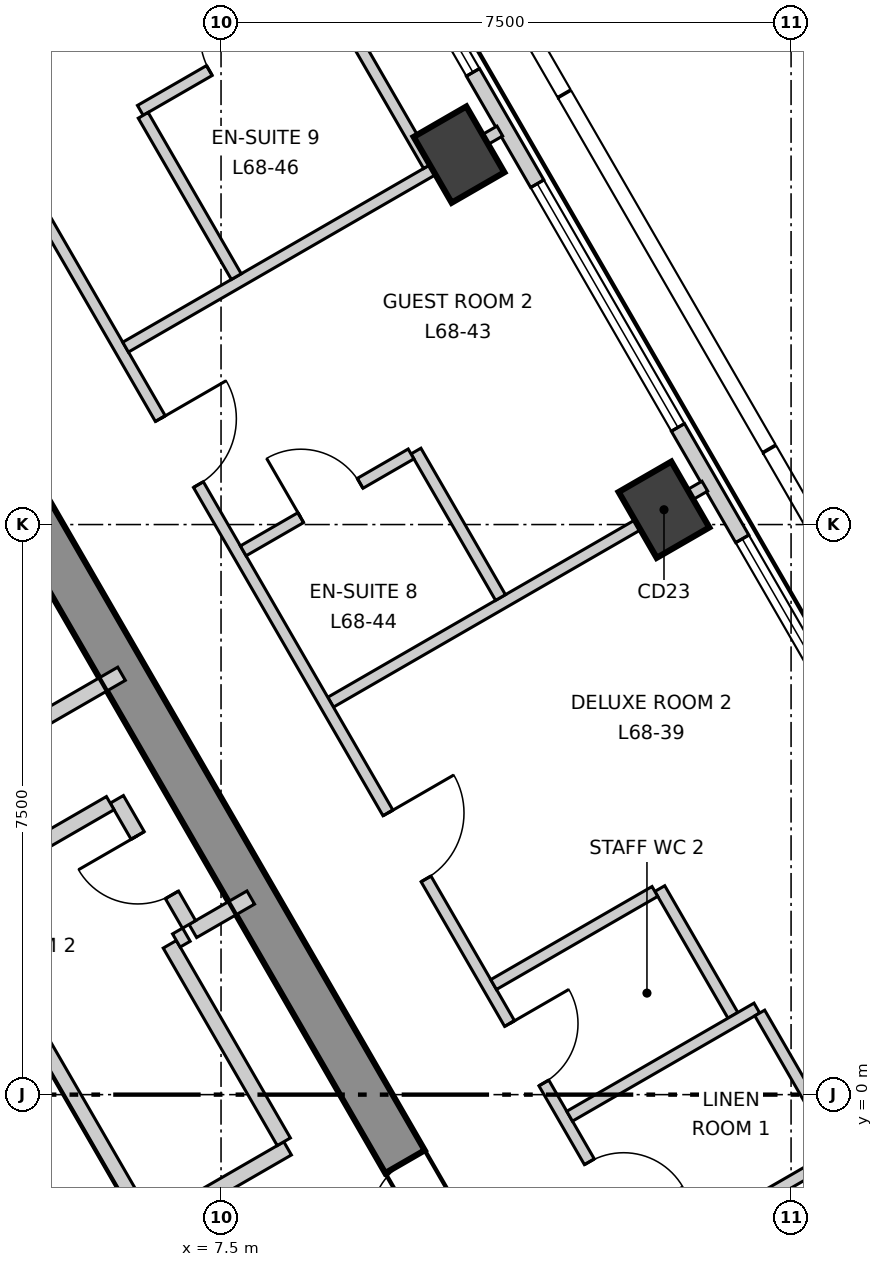
"""IFC4 building model, lengths in metres.
Left out: names, types, materials, properties, quantities, classifications, styles, units other than length and angle.
Written with IfcOpenShell. Run it as: python <this file> out.ifc"""

import sys

from ifc_helpers import new_model, si_unit, direction, frame, frame_2d, origin, origin_2d, place, context, subcontext, project, spatial, polyline, rectangle, outline, extrude, element, fill, save


model = new_model("IFC4")
c1 = context("Model", 3, precision=1e-05, world=origin(), true_north=direction((0.0, 1.0)))
c2 = subcontext(c1, "Body", "Model", "MODEL_VIEW")
j1 = project(units=[si_unit("LENGTHUNIT", "METRE"), si_unit("PLANEANGLEUNIT", "RADIAN")], contexts=[c1])
p1 = place(None, origin())
s1 = spatial("IfcSite", under=j1, at=p1, CompositionType="ELEMENT")
p2 = place(p1, origin())
s2 = spatial("IfcBuilding", under=s1, at=p2, CompositionType="ELEMENT")
p3 = place(p2, frame((0.0, 0.0, 289.9)))
s3 = spatial("IfcBuildingStorey", under=s2, at=p3, CompositionType="ELEMENT", Elevation=289.9)
p4 = place(p3, frame((12.384, -5.15, -0.3), z_axis=(0.0, 0.0, 1.0), x_axis=(-0.500000539815, 0.866025092122, 0.0)))
e1 = element("IfcWall", 1, at=p4, inside=s3, PredefinedType="SHEAR", context=c2, shape_type="SweptSolid", body=[
    extrude(outline(polyline([(-0.173, -0.301), (1.795, -0.301), (3.763, -0.301), (5.731, -0.301), (7.7, -0.301), (9.668, -0.301), (11.636, -0.301), (13.604, -0.3), (15.573, -0.3), (17.541, -0.3), (19.509, -0.3), (21.477, -0.3), (21.131, 0.3), (19.226, 0.3), (17.321, 0.3), (15.415, 0.3), (13.51, 0.3), (11.605, 0.3), (9.699, 0.3), (7.794, 0.3), (5.889, 0.3), (3.984, 0.3), (2.078, 0.3), (0.173, 0.3), (-0.173, -0.301)])), origin(), (0.0, 0.0, 1.0), 3.6),
])
p5 = place(p4, frame((16.378, 0.0, 0.3)))
e2 = element("IfcOpeningElement", 2, at=p5, cuts=e1, PredefinedType="OPENING", context=c2, shape_type="SweptSolid", body=[
    extrude(rectangle(XDim=0.9, YDim=2.1, at=frame_2d((0.45, 1.05))), frame((0.0, 0.31, 0.0), z_axis=(0.0, -1.0, 0.0), x_axis=(1.0, 0.0, 0.0)), (0.0, 0.0, 1.0), 0.621),
])
p6 = place(p4, frame((4.026, 0.0, 0.3)))
e3 = element("IfcOpeningElement", 3, at=p6, cuts=e1, PredefinedType="OPENING", context=c2, shape_type="SweptSolid", body=[
    extrude(rectangle(XDim=0.9, YDim=2.1, at=frame_2d((0.45, 1.05))), frame((0.0, 0.31, 0.0), z_axis=(0.0, -1.0, 0.0), x_axis=(1.0, 0.0, 0.0)), (0.0, 0.0, 1.0), 0.621),
])
for number, where, z_axis, x_axis in (
    (4, (13.328, 7.695, -0.3), (0.0, 0.0, 1.0), (-0.5, 0.866, 0.0)),
    (5, (10.631, 12.367, -0.3), (0.0, 0.0, 1.0), (-0.5, 0.866, 0.0)),
):
    element("IfcColumn", number, at=place(p3, frame(where, z_axis=z_axis, x_axis=x_axis)), inside=s3, PredefinedType="COLUMN", context=c2, shape_type="SweptSolid", body=[
        extrude(rectangle(XDim=1.0, YDim=0.8, at=origin_2d()), origin(), (0.0, 0.0, 1.0), 3.6),
    ])
p7 = place(p3, frame((25.375, -11.77, 0.0), z_axis=(0.0, 0.0, 1.0), x_axis=(-0.500008134474, 0.866020707292, 0.0)))
e6 = element("IfcWall", 6, at=p7, inside=s3, PredefinedType="ELEMENTEDWALL", context=c2, shape_type="SweptSolid", body=[
    extrude(rectangle(XDim=45.741, YDim=0.2, at=frame_2d((22.871, 0.0))), origin(), (0.0, 0.0, 1.0), 3.3),
])
p8 = place(p7, frame((2.15, 0.0, 0.9)))
e7 = element("IfcOpeningElement", 7, at=p8, cuts=e6, PredefinedType="OPENING", context=c2, shape_type="SweptSolid", body=[
    extrude(rectangle(XDim=3.7, YDim=2.2, at=frame_2d((1.85, 1.1))), frame((0.0, 0.11, 0.0), z_axis=(0.0, -1.0, 0.0), x_axis=(1.0, 0.0, 0.0)), (0.0, 0.0, 1.0), 0.22),
])
p9 = place(p7, frame((7.544, 0.0, 0.9)))
e8 = element("IfcOpeningElement", 8, at=p9, cuts=e6, PredefinedType="OPENING", context=c2, shape_type="SweptSolid", body=[
    extrude(rectangle(XDim=3.7, YDim=2.2, at=frame_2d((1.85, 1.1))), frame((0.0, 0.11, 0.0), z_axis=(0.0, -1.0, 0.0), x_axis=(1.0, 0.0, 0.0)), (0.0, 0.0, 1.0), 0.22),
])
p10 = place(p7, frame((12.939, 0.0, 0.9)))
e9 = element("IfcOpeningElement", 9, at=p10, cuts=e6, PredefinedType="OPENING", context=c2, shape_type="SweptSolid", body=[
    extrude(rectangle(XDim=3.7, YDim=2.2, at=frame_2d((1.85, 1.1))), frame((0.0, 0.11, 0.0), z_axis=(0.0, -1.0, 0.0), x_axis=(1.0, 0.0, 0.0)), (0.0, 0.0, 1.0), 0.22),
])
p11 = place(p7, frame((18.333, 0.0, 0.9)))
e10 = element("IfcOpeningElement", 10, at=p11, cuts=e6, PredefinedType="OPENING", context=c2, shape_type="SweptSolid", body=[
    extrude(rectangle(XDim=3.7, YDim=2.2, at=frame_2d((1.85, 1.1))), frame((0.0, 0.11, 0.0), z_axis=(0.0, -1.0, 0.0), x_axis=(1.0, 0.0, 0.0)), (0.0, 0.0, 1.0), 0.22),
])
p12 = place(p7, frame((23.728, 0.0, 0.9)))
e11 = element("IfcOpeningElement", 11, at=p12, cuts=e6, PredefinedType="OPENING", context=c2, shape_type="SweptSolid", body=[
    extrude(rectangle(XDim=3.7, YDim=2.2, at=frame_2d((1.85, 1.1))), frame((0.0, 0.11, 0.0), z_axis=(0.0, -1.0, 0.0), x_axis=(1.0, 0.0, 0.0)), (0.0, 0.0, 1.0), 0.22),
])
p13 = place(p7, frame((29.122, 0.0, 0.9)))
e12 = element("IfcOpeningElement", 12, at=p13, cuts=e6, PredefinedType="OPENING", context=c2, shape_type="SweptSolid", body=[
    extrude(rectangle(XDim=3.7, YDim=2.2, at=frame_2d((1.85, 1.1))), frame((0.0, 0.11, 0.0), z_axis=(0.0, -1.0, 0.0), x_axis=(1.0, 0.0, 0.0)), (0.0, 0.0, 1.0), 0.22),
])
p14 = place(p7, frame((34.517, 0.0, 0.9)))
e13 = element("IfcOpeningElement", 13, at=p14, cuts=e6, PredefinedType="OPENING", context=c2, shape_type="SweptSolid", body=[
    extrude(rectangle(XDim=3.7, YDim=2.2, at=frame_2d((1.85, 1.1))), frame((0.0, 0.11, 0.0), z_axis=(0.0, -1.0, 0.0), x_axis=(1.0, 0.0, 0.0)), (0.0, 0.0, 1.0), 0.22),
])
p15 = place(p7, frame((39.911, 0.0, 0.9)))
e14 = element("IfcOpeningElement", 14, at=p15, cuts=e6, PredefinedType="OPENING", context=c2, shape_type="SweptSolid", body=[
    extrude(rectangle(XDim=3.7, YDim=2.2, at=frame_2d((1.85, 1.1))), frame((0.0, 0.11, 0.0), z_axis=(0.0, -1.0, 0.0), x_axis=(1.0, 0.0, 0.0)), (0.0, 0.0, 1.0), 0.22),
])
p16 = place(p3, frame((8.942, 5.163, 0.0), z_axis=(0.0, 0.0, 1.0), x_axis=(0.86606758311, 0.499926936147, 0.0)))
e15 = element("IfcWall", 15, at=p16, inside=s3, PredefinedType="PARTITIONING", context=c2, shape_type="SweptSolid", body=[
    extrude(rectangle(XDim=5.684, YDim=0.15, at=frame_2d((2.842, 0.0))), origin(), (0.0, 0.0, 1.0), 2.8),
])
p17 = place(p3, frame((0.075, 20.37, 0.0), z_axis=(0.0, 0.0, 1.0), x_axis=(0.500009775255, -0.866019759965, 0.0)))
e16 = element("IfcWall", 16, at=p17, inside=s3, PredefinedType="PARTITIONING", context=c2, shape_type="SweptSolid", body=[
    extrude(rectangle(XDim=35.207, YDim=0.15, at=frame_2d((17.604, 0.0))), origin(), (0.0, 0.0, 1.0), 3.3),
])
p18 = place(p17, frame((31.407, 0.0, 0.0)))
e17 = element("IfcOpeningElement", 17, at=p18, cuts=e16, PredefinedType="OPENING", context=c2, shape_type="SweptSolid", body=[
    extrude(rectangle(XDim=1.0, YDim=2.1, at=frame_2d((0.5, 1.05))), frame((0.0, 0.085, 0.0), z_axis=(0.0, -1.0, 0.0), x_axis=(1.0, 0.0, 0.0)), (0.0, 0.0, 1.0), 0.17),
])
p19 = place(p17, frame((19.243, 0.0, 0.0)))
e18 = element("IfcOpeningElement", 18, at=p19, cuts=e16, PredefinedType="OPENING", context=c2, shape_type="SweptSolid", body=[
    extrude(rectangle(XDim=1.0, YDim=2.1, at=frame_2d((0.5, 1.05))), frame((0.0, 0.085, 0.0), z_axis=(0.0, -1.0, 0.0), x_axis=(1.0, 0.0, 0.0)), (0.0, 0.0, 1.0), 0.17),
])
p20 = place(p17, frame((24.543, 0.0, 0.0)))
e19 = element("IfcOpeningElement", 19, at=p20, cuts=e16, PredefinedType="OPENING", context=c2, shape_type="SweptSolid", body=[
    extrude(rectangle(XDim=0.9, YDim=2.1, at=frame_2d((0.45, 1.05))), frame((0.0, 0.085, 0.0), z_axis=(0.0, -1.0, 0.0), x_axis=(1.0, 0.0, 0.0)), (0.0, 0.0, 1.0), 0.17),
])
p21 = place(p17, frame((22.443, 0.0, 0.0)))
e20 = element("IfcOpeningElement", 20, at=p21, cuts=e16, PredefinedType="OPENING", context=c2, shape_type="SweptSolid", body=[
    extrude(rectangle(XDim=0.9, YDim=2.1, at=frame_2d((0.45, 1.05))), frame((0.0, 0.085, 0.0), z_axis=(0.0, -1.0, 0.0), x_axis=(1.0, 0.0, 0.0)), (0.0, 0.0, 1.0), 0.17),
])
p22 = place(p17, frame((13.253, 0.0, 0.0)))
e21 = element("IfcOpeningElement", 21, at=p22, cuts=e16, PredefinedType="OPENING", context=c2, shape_type="SweptSolid", body=[
    extrude(rectangle(XDim=1.0, YDim=2.1, at=frame_2d((0.5, 1.05))), frame((0.0, 0.085, 0.0), z_axis=(0.0, -1.0, 0.0), x_axis=(1.0, 0.0, 0.0)), (0.0, 0.0, 1.0), 0.17),
])
p23 = place(p17, frame((5.559, 0.0, 0.0)))
e22 = element("IfcOpeningElement", 22, at=p23, cuts=e16, PredefinedType="OPENING", context=c2, shape_type="SweptSolid", body=[
    extrude(rectangle(XDim=1.0, YDim=2.1, at=frame_2d((0.5, 1.05))), frame((0.0, 0.085, 0.0), z_axis=(0.0, -1.0, 0.0), x_axis=(1.0, 0.0, 0.0)), (0.0, 0.0, 1.0), 0.17),
])
p24 = place(p3, frame((6.244, 9.834, 0.0), z_axis=(0.0, 0.0, 1.0), x_axis=(0.866017549727, 0.50001360338, 0.0)))
e23 = element("IfcWall", 23, at=p24, inside=s3, PredefinedType="PARTITIONING", context=c2, shape_type="SweptSolid", body=[
    extrude(rectangle(XDim=5.686, YDim=0.15, at=frame_2d((2.843, 0.0))), origin(), (0.0, 0.0, 1.0), 3.3),
])
p25 = place(p3, frame((13.273, 2.711, 0.0), z_axis=(0.0, 0.0, 1.0), x_axis=(0.499671230855, -0.86621513555, 0.0)))
e24 = element("IfcWall", 24, at=p25, inside=s3, PredefinedType="PARTITIONING", context=c2, shape_type="SweptSolid", body=[
    extrude(rectangle(XDim=1.926, YDim=0.15, at=frame_2d((0.963, 0.0))), origin(), (0.0, 0.0, 1.0), 3.3),
])
p26 = place(p3, frame((11.086, 1.448, 0.0), z_axis=(0.0, 0.0, 1.0), x_axis=(0.8660395779, 0.499975448907, 0.0)))
e25 = element("IfcWall", 25, at=p26, inside=s3, PredefinedType="PARTITIONING", context=c2, shape_type="SweptSolid", body=[
    extrude(rectangle(XDim=2.45, YDim=0.15, at=frame_2d((1.225, 0.0))), origin(), (0.0, 0.0, 1.0), 3.3),
])
p27 = place(p3, frame((12.086, -0.284, 0.0), z_axis=(0.0, 0.0, 1.0), x_axis=(0.865995540999, 0.500051720295, 0.0)))
e26 = element("IfcWall", 26, at=p27, inside=s3, PredefinedType="PARTITIONING", context=c2, shape_type="SweptSolid", body=[
    extrude(rectangle(XDim=2.845, YDim=0.15, at=frame_2d((1.423, 0.0))), origin(), (0.0, 0.0, 1.0), 3.3),
])
p28 = place(p3, frame((13.186, -2.189, 0.0), z_axis=(0.0, 0.0, 1.0), x_axis=(0.866122712398, 0.499831418649, 0.0)))
e27 = element("IfcWall", 27, at=p28, inside=s3, PredefinedType="PARTITIONING", context=c2, shape_type="SweptSolid", body=[
    extrude(rectangle(XDim=2.845, YDim=0.15, at=frame_2d((1.422, 0.0))), origin(), (0.0, 0.0, 1.0), 3.3),
])
p29 = place(p3, frame((14.588, 1.074, 0.0), z_axis=(0.0, 0.0, 1.0), x_axis=(0.499942325911, -0.866058699375, 0.0)))
e28 = element("IfcWall", 28, at=p29, inside=s3, PredefinedType="PARTITIONING", context=c2, shape_type="SweptSolid", body=[
    extrude(rectangle(XDim=2.051, YDim=0.15, at=frame_2d((1.025, 0.0))), origin(), (0.0, 0.0, 1.0), 3.3),
])
p30 = place(p3, frame((10.065, 8.467, 0.0), z_axis=(0.0, 0.0, 1.0), x_axis=(0.499833278392, -0.866121639155, 0.0)))
e29 = element("IfcWall", 29, at=p30, inside=s3, PredefinedType="PARTITIONING", context=c2, shape_type="SweptSolid", body=[
    extrude(rectangle(XDim=2.225, YDim=0.15, at=frame_2d((1.112, 0.0))), origin(), (0.0, 0.0, 1.0), 3.3),
])
p31 = place(p3, frame((7.792, 7.154, 0.0), z_axis=(0.0, 0.0, 1.0), x_axis=(0.866006986733, 0.500031897912, 0.0)))
e30 = element("IfcWall", 30, at=p31, inside=s3, PredefinedType="PARTITIONING", context=c2, shape_type="SweptSolid", body=[
    extrude(rectangle(XDim=2.55, YDim=0.15, at=frame_2d((1.275, 0.0))), origin(), (0.0, 0.0, 1.0), 3.3),
])
p32 = place(p31, frame((0.875, 0.0, 0.0)))
e31 = element("IfcOpeningElement", 31, at=p32, cuts=e30, PredefinedType="OPENING", context=c2, shape_type="SweptSolid", body=[
    extrude(rectangle(XDim=0.9, YDim=2.1, at=frame_2d((0.45, 1.05))), frame((0.0, 0.085, 0.0), z_axis=(0.0, -1.0, 0.0), x_axis=(1.0, 0.0, 0.0)), (0.0, 0.0, 1.0), 0.17),
])
p33 = place(p3, frame((8.967, 14.409, 0.0), z_axis=(0.0, 0.0, 1.0), x_axis=(0.500079482444, -0.865979509711, 0.0)))
e32 = element("IfcWall", 32, at=p33, inside=s3, PredefinedType="PARTITIONING", context=c2, shape_type="SweptSolid", body=[
    extrude(rectangle(XDim=2.525, YDim=0.15, at=frame_2d((1.263, 0.0))), origin(), (0.0, 0.0, 1.0), 2.6),
])
p34 = place(p3, frame((6.438, 12.949, 0.0), z_axis=(0.0, 0.0, 1.0), x_axis=(0.866107001057, 0.499858642738, 0.0)))
e33 = element("IfcWall", 33, at=p34, inside=s3, PredefinedType="PARTITIONING", context=c2, shape_type="SweptSolid", body=[
    extrude(rectangle(XDim=2.845, YDim=0.15, at=frame_2d((1.422, 0.0))), origin(), (0.0, 0.0, 1.0), 3.3),
])
p35 = place(p34, frame((1.05, 0.0, 0.0)))
e34 = element("IfcOpeningElement", 34, at=p35, cuts=e33, PredefinedType="OPENING", context=c2, shape_type="SweptSolid", body=[
    extrude(rectangle(XDim=0.9, YDim=2.1, at=frame_2d((0.45, 1.05))), frame((0.0, 0.085, 0.0), z_axis=(0.0, -1.0, 0.0), x_axis=(1.0, 0.0, 0.0)), (0.0, 0.0, 1.0), 0.17),
])
p36 = place(p3, frame((6.476, 12.884, 0.0), z_axis=(0.0, 0.0, 1.0), x_axis=(0.499900713578, -0.866082719239, 0.0)))
e35 = element("IfcWall", 35, at=p36, inside=s3, PredefinedType="PARTITIONING", context=c2, shape_type="SweptSolid", body=[
    extrude(rectangle(XDim=2.45, YDim=0.15, at=frame_2d((1.225, 0.0))), origin(), (0.0, 0.0, 1.0), 3.3),
])
p37 = place(p3, frame((1.578, 2.874, 0.0), z_axis=(0.0, 0.0, 1.0), x_axis=(0.866045911672, 0.499964477614, 0.0)))
e36 = element("IfcWall", 36, at=p37, inside=s3, PredefinedType="SOLIDWALL", context=c2, shape_type="SweptSolid", body=[
    extrude(rectangle(XDim=5.327, YDim=0.2, at=frame_2d((2.663, 0.0))), origin(), (0.0, 0.0, 1.0), 3.3),
])
p38 = place(p37, frame((2.496, 0.0, 0.0)))
e37 = element("IfcOpeningElement", 37, at=p38, cuts=e36, PredefinedType="OPENING", context=c2, shape_type="SweptSolid", body=[
    extrude(rectangle(XDim=1.1, YDim=2.1, at=frame_2d((0.55, 1.05))), frame((0.0, 0.11, 0.0), z_axis=(0.0, -1.0, 0.0), x_axis=(1.0, 0.0, 0.0)), (0.0, 0.0, 1.0), 0.22),
])
p39 = place(p3, frame((5.007, 0.928, 0.0), z_axis=(0.0, 0.0, 1.0), x_axis=(0.499899694197, -0.866083307622, 0.0)))
e38 = element("IfcWall", 38, at=p39, inside=s3, PredefinedType="SOLIDWALL", context=c2, shape_type="SweptSolid", body=[
    extrude(rectangle(XDim=3.1, YDim=0.2, at=frame_2d((1.55, 0.0))), origin(), (0.0, 0.0, 1.0), 3.3),
])
p40 = place(p3, frame((7.129, 2.153, 0.0), z_axis=(0.0, 0.0, 1.0), x_axis=(0.866083962871, 0.499898558967, 0.0)))
e39 = element("IfcWall", 39, at=p40, inside=s3, PredefinedType="SOLIDWALL", context=c2, shape_type="SweptSolid", body=[
    extrude(rectangle(XDim=0.88, YDim=0.2, at=frame_2d((0.44, 0.0))), origin(), (0.0, 0.0, 1.0), 3.3),
])
p41 = place(p3, frame((6.129, 3.885, 0.0), z_axis=(0.0, 0.0, 1.0), x_axis=(0.499952260202, -0.866052964615, 0.0)))
e40 = element("IfcWall", 40, at=p41, inside=s3, PredefinedType="SOLIDWALL", context=c2, shape_type="SweptSolid", body=[
    extrude(rectangle(XDim=1.901, YDim=0.2, at=frame_2d((0.95, 0.0))), origin(), (0.0, 0.0, 1.0), 3.3),
])
p42 = place(p41, frame((0.55, 0.0, 0.0)))
e41 = element("IfcOpeningElement", 41, at=p42, cuts=e40, PredefinedType="OPENING", context=c2, shape_type="SweptSolid", body=[
    extrude(rectangle(XDim=0.9, YDim=2.1, at=frame_2d((0.45, 1.05))), frame((0.0, 0.11, 0.0), z_axis=(0.0, -1.0, 0.0), x_axis=(1.0, 0.0, 0.0)), (0.0, 0.0, 1.0), 0.22),
])
p43 = place(p3, frame((2.275, 1.66, 0.0), z_axis=(0.0, 0.0, 1.0), x_axis=(0.866013608182, 0.500020430026, 0.0)))
e42 = element("IfcWall", 42, at=p43, inside=s3, PredefinedType="SOLIDWALL", context=c2, shape_type="SweptSolid", body=[
    extrude(rectangle(XDim=4.35, YDim=0.2, at=frame_2d((2.175, 0.0))), origin(), (0.0, 0.0, 1.0), 3.3),
])
p44 = place(p3, frame((6.642, -1.708, 0.0), z_axis=(0.0, 0.0, 1.0), x_axis=(0.866043441391, 0.499968756647, 0.0)))
e43 = element("IfcWall", 43, at=p44, inside=s3, PredefinedType="SOLIDWALL", context=c2, shape_type="SweptSolid", body=[
    extrude(rectangle(XDim=2.002, YDim=0.2, at=frame_2d((1.001, 0.0))), origin(), (0.0, 0.0, 1.0), 3.3),
])
p45 = place(p3, frame((6.826, 1.978, 0.0), z_axis=(0.0, 0.0, 1.0), x_axis=(0.499990139034, -0.866031096941, 0.0)))
e44 = element("IfcWall", 44, at=p45, inside=s3, PredefinedType="SOLIDWALL", context=c2, shape_type="SweptSolid", body=[
    extrude(rectangle(XDim=3.0, YDim=0.2, at=frame_2d((1.5, 0.0))), origin(), (0.0, 0.0, 1.0), 3.3),
])
p46 = place(p3, frame((6.912, 2.028, 0.0), z_axis=(0.0, 0.0, 1.0), x_axis=(0.866559367082, 0.499074005857, 0.0)))
e45 = element("IfcWall", 45, at=p46, inside=s3, PredefinedType="SOLIDWALL", context=c2, shape_type="SweptSolid", body=[
    extrude(rectangle(XDim=0.152, YDim=0.2, at=frame_2d((0.076, 0.0))), origin(), (0.0, 0.0, 1.0), 3.3),
])
p47 = place(p11, origin())
e46 = element("IfcWindow", 46, at=p47, inside=s3, PartitioningType="SINGLE_PANEL", PredefinedType="WINDOW", context=c2, shape_type="SweptSolid", body=[
    extrude(rectangle(XDim=3.7, YDim=2.2, at=frame_2d((1.85, 1.1))), frame((0.0, 0.03, 0.0), z_axis=(0.0, -1.0, 0.0), x_axis=(1.0, 0.0, 0.0)), (0.0, 0.0, 1.0), 0.06),
])
fill(e10, e46)
p48 = place(p12, origin())
e47 = element("IfcWindow", 47, at=p48, inside=s3, PartitioningType="SINGLE_PANEL", PredefinedType="WINDOW", context=c2, shape_type="SweptSolid", body=[
    extrude(rectangle(XDim=3.7, YDim=2.2, at=frame_2d((1.85, 1.1))), frame((0.0, 0.03, 0.0), z_axis=(0.0, -1.0, 0.0), x_axis=(1.0, 0.0, 0.0)), (0.0, 0.0, 1.0), 0.06),
])
fill(e11, e47)
p49 = place(p13, origin())
e48 = element("IfcWindow", 48, at=p49, inside=s3, PartitioningType="SINGLE_PANEL", PredefinedType="WINDOW", context=c2, shape_type="SweptSolid", body=[
    extrude(rectangle(XDim=3.7, YDim=2.2, at=frame_2d((1.85, 1.1))), frame((0.0, 0.03, 0.0), z_axis=(0.0, -1.0, 0.0), x_axis=(1.0, 0.0, 0.0)), (0.0, 0.0, 1.0), 0.06),
])
fill(e12, e48)
p50 = place(p19, origin())
e49 = element("IfcDoor", 49, at=p50, inside=s3, OperationType="SINGLE_SWING_RIGHT", PredefinedType="DOOR", context=c2, shape_type="SweptSolid", body=[
    extrude(rectangle(XDim=1.0, YDim=2.1, at=frame_2d((0.5, 1.05))), frame((0.0, 0.025, 0.0), z_axis=(0.0, -1.0, 0.0), x_axis=(1.0, 0.0, 0.0)), (0.0, 0.0, 1.0), 0.05),
])
fill(e18, e49)
p51 = place(p20, origin())
e50 = element("IfcDoor", 50, at=p51, inside=s3, OperationType="SINGLE_SWING_LEFT", PredefinedType="DOOR", context=c2, shape_type="SweptSolid", body=[
    extrude(rectangle(XDim=0.9, YDim=2.1, at=frame_2d((0.45, 1.05))), frame((0.0, 0.025, 0.0), z_axis=(0.0, -1.0, 0.0), x_axis=(1.0, 0.0, 0.0)), (0.0, 0.0, 1.0), 0.05),
])
fill(e19, e50)
p52 = place(p21, origin())
e51 = element("IfcDoor", 51, at=p52, inside=s3, OperationType="SINGLE_SWING_RIGHT", PredefinedType="DOOR", context=c2, shape_type="SweptSolid", body=[
    extrude(rectangle(XDim=0.9, YDim=2.1, at=frame_2d((0.45, 1.05))), frame((0.0, 0.025, 0.0), z_axis=(0.0, -1.0, 0.0), x_axis=(1.0, 0.0, 0.0)), (0.0, 0.0, 1.0), 0.05),
])
fill(e20, e51)
p53 = place(p22, origin())
e52 = element("IfcDoor", 52, at=p53, inside=s3, OperationType="SINGLE_SWING_RIGHT", PredefinedType="DOOR", context=c2, shape_type="SweptSolid", body=[
    extrude(rectangle(XDim=1.0, YDim=2.1, at=frame_2d((0.5, 1.05))), frame((0.0, 0.025, 0.0), z_axis=(0.0, -1.0, 0.0), x_axis=(1.0, 0.0, 0.0)), (0.0, 0.0, 1.0), 0.05),
])
fill(e21, e52)
p54 = place(p32, origin())
e53 = element("IfcDoor", 53, at=p54, inside=s3, OperationType="SINGLE_SWING_RIGHT", PredefinedType="DOOR", context=c2, shape_type="SweptSolid", body=[
    extrude(rectangle(XDim=0.9, YDim=2.1, at=frame_2d((0.45, 1.05))), frame((0.0, 0.025, 0.0), z_axis=(0.0, -1.0, 0.0), x_axis=(1.0, 0.0, 0.0)), (0.0, 0.0, 1.0), 0.05),
])
fill(e31, e53)
p55 = place(p35, origin())
e54 = element("IfcDoor", 54, at=p55, inside=s3, OperationType="SINGLE_SWING_LEFT", PredefinedType="DOOR", context=c2, shape_type="SweptSolid", body=[
    extrude(rectangle(XDim=0.9, YDim=2.1, at=frame_2d((0.45, 1.05))), frame((0.0, 0.025, 0.0), z_axis=(0.0, -1.0, 0.0), x_axis=(1.0, 0.0, 0.0)), (0.0, 0.0, 1.0), 0.05),
])
fill(e34, e54)
p56 = place(p6, origin())
e55 = element("IfcDoor", 55, at=p56, inside=s3, OperationType="SINGLE_SWING_RIGHT", PredefinedType="DOOR", context=c2, shape_type="SweptSolid", body=[
    extrude(rectangle(XDim=0.9, YDim=2.1, at=frame_2d((0.45, 1.05))), frame((0.0, 0.025, 0.0), z_axis=(0.0, -1.0, 0.0), x_axis=(1.0, 0.0, 0.0)), (0.0, 0.0, 1.0), 0.05),
])
fill(e3, e55)
p57 = place(p42, origin())
e56 = element("IfcDoor", 56, at=p57, inside=s3, OperationType="SINGLE_SWING_LEFT", PredefinedType="DOOR", context=c2, shape_type="SweptSolid", body=[
    extrude(rectangle(XDim=0.9, YDim=2.1, at=frame_2d((0.45, 1.05))), frame((0.0, 0.025, 0.0), z_axis=(0.0, -1.0, 0.0), x_axis=(1.0, 0.0, 0.0)), (0.0, 0.0, 1.0), 0.05),
])
fill(e41, e56)
save(model, sys.argv[1])
